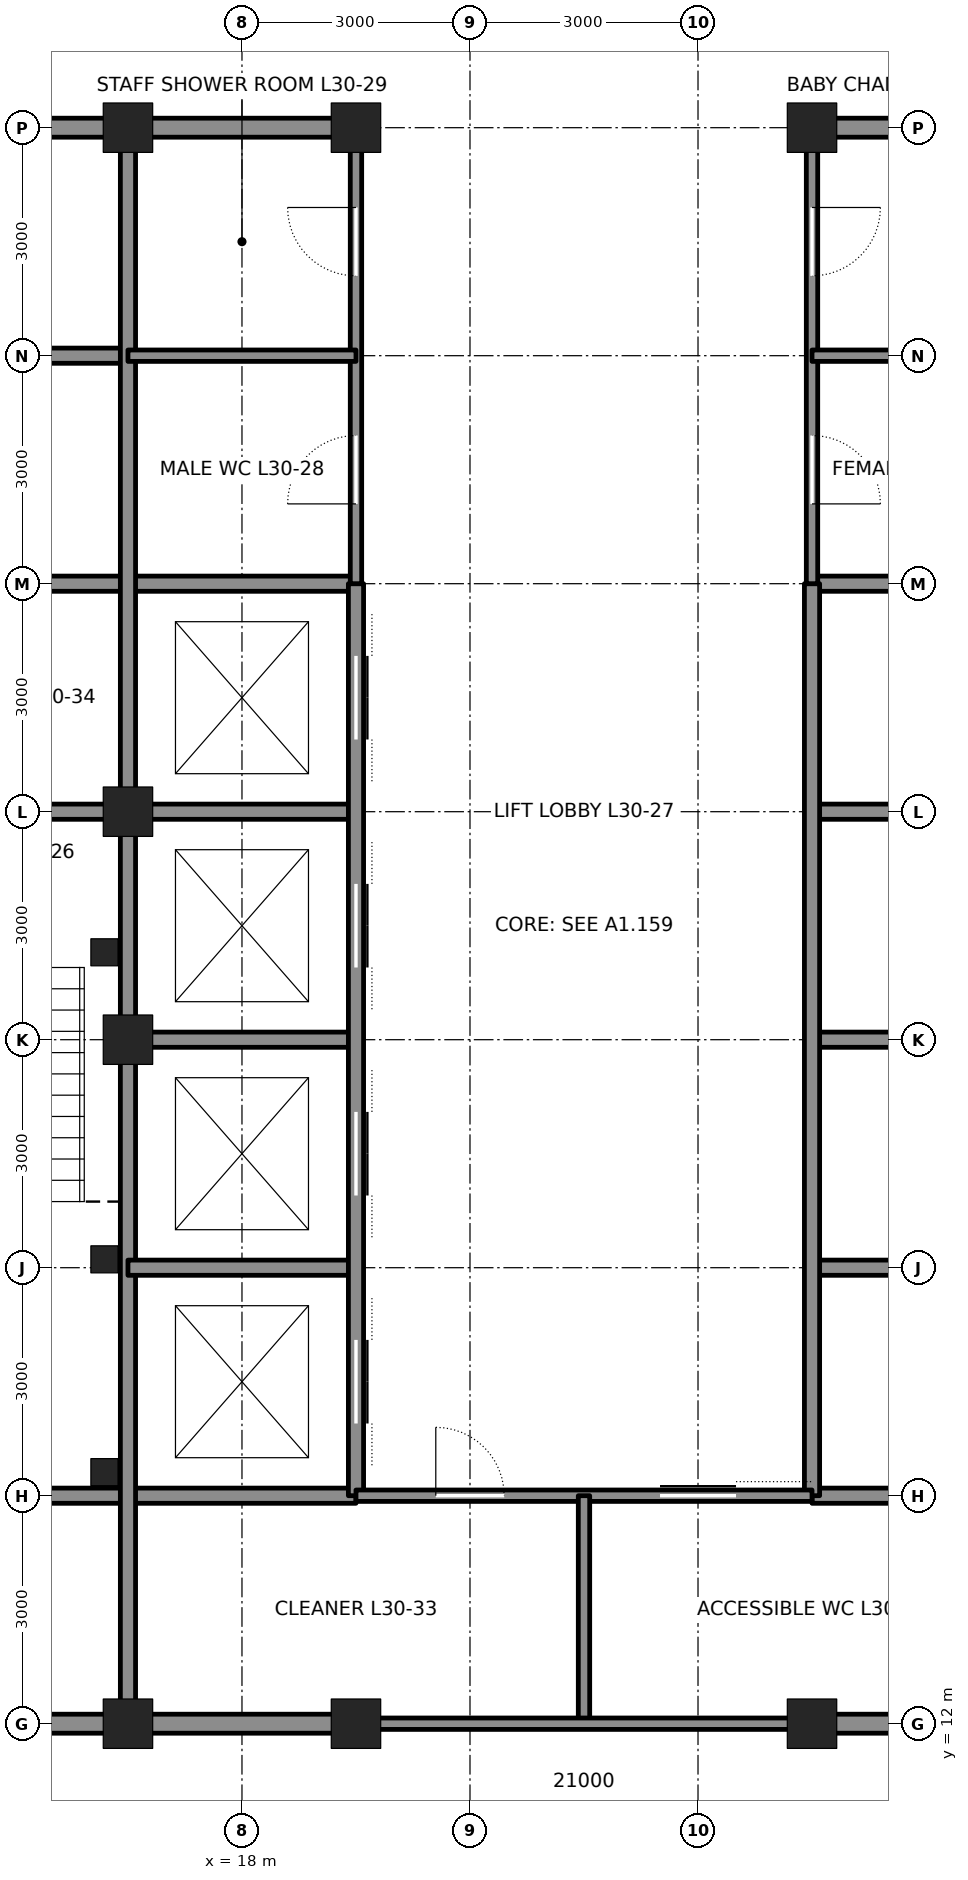
"""IFC4 building model, lengths in metres.
Left out: names, types, materials, properties, quantities, classifications, styles, units other than length and angle.
Written with IfcOpenShell. Run it as: python <this file> out.ifc"""

import sys

from ifc_helpers import new_model, si_unit, direction, frame, frame_2d, origin, origin_2d, place, context, subcontext, project, spatial, rectangle, hollow_rectangle, extrude, element, fill, save


model = new_model("IFC4")
c1 = context("Model", 3, precision=1e-05, world=origin(), true_north=direction((0.0, 1.0)))
c2 = subcontext(c1, "Body", "Model", "MODEL_VIEW")
j1 = project(units=[si_unit("LENGTHUNIT", "METRE"), si_unit("PLANEANGLEUNIT", "RADIAN")], contexts=[c1])
p1 = place(None, origin())
s1 = spatial("IfcSite", under=j1, at=p1, CompositionType="ELEMENT")
p2 = place(p1, origin())
s2 = spatial("IfcBuilding", under=s1, at=p2, CompositionType="ELEMENT")
p3 = place(p2, frame((0.0, 0.0, 140.4)))
s3 = spatial("IfcBuildingStorey", under=s2, at=p3, CompositionType="ELEMENT", Elevation=140.4)
for number, where, z_axis, x_axis in (
    (1, (16.5, 12.0, 0.0), (0.0, 0.0, 1.0), (1.0, 0.0, 0.0)),
    (2, (19.5, 12.0, 0.0), (0.0, 0.0, 1.0), (1.0, 0.0, 0.0)),
    (3, (25.5, 12.0, 0.0), (0.0, 0.0, 1.0), (1.0, 0.0, 0.0)),
    (4, (16.5, 33.0, 0.0), (0.0, 0.0, 1.0), (1.0, 0.0, 0.0)),
    (5, (19.5, 33.0, 0.0), (0.0, 0.0, 1.0), (1.0, 0.0, 0.0)),
    (6, (25.5, 33.0, 0.0), (0.0, 0.0, 1.0), (1.0, 0.0, 0.0)),
    (7, (16.5, 21.0, 0.0), (0.0, 0.0, 1.0), (1.0, 0.0, 0.0)),
    (8, (16.5, 24.0, 0.0), (0.0, 0.0, 1.0), (1.0, 0.0, 0.0)),
):
    element("IfcColumn", number, at=place(p3, frame(where, z_axis=z_axis, x_axis=x_axis)), inside=s3, PredefinedType="COLUMN", context=c2, shape_type="SweptSolid", body=[
        extrude(hollow_rectangle(XDim=0.65, YDim=0.65, WallThickness=0.065, at=origin_2d()), origin(), (0.0, 0.0, 1.0), 4.2),
    ])
p4 = place(p3, frame((12.25, 12.0, 0.0), z_axis=(0.0, 0.0, 1.0), x_axis=(1.0, 0.0, 0.0)))
e9 = element("IfcWall", 9, at=p4, inside=s3, PredefinedType="SOLIDWALL", context=c2, shape_type="SweptSolid", body=[
    extrude(rectangle(XDim=4.0, YDim=0.25, at=frame_2d((2.0, 0.0))), origin(), (0.0, 0.0, 1.0), 3.182),
])
for number, where, z_axis, x_axis in (
    (10, (16.75, 12.0, 0.0), (0.0, 0.0, 1.0), (1.0, 0.0, 0.0)),
    (11, (25.75, 12.0, 0.0), (0.0, 0.0, 1.0), (1.0, 0.0, 0.0)),
):
    element("IfcWall", number, at=place(p3, frame(where, z_axis=z_axis, x_axis=x_axis)), inside=s3, PredefinedType="SOLIDWALL", context=c2, shape_type="SweptSolid", body=[
        extrude(rectangle(XDim=2.5, YDim=0.25, at=frame_2d((1.25, 0.0))), origin(), (0.0, 0.0, 1.0), 3.182),
    ])
for number, where, z_axis, x_axis in (
    (12, (12.0, 15.0, 0.0), (0.0, 0.0, 1.0), (1.0, 0.0, 0.0)),
    (13, (25.5, 15.0, 0.0), (0.0, 0.0, 1.0), (1.0, 0.0, 0.0)),
):
    element("IfcWall", number, at=place(p3, frame(where, z_axis=z_axis, x_axis=x_axis)), inside=s3, PredefinedType="SOLIDWALL", context=c2, shape_type="SweptSolid", body=[
        extrude(rectangle(XDim=7.5, YDim=0.2, at=frame_2d((3.75, 0.0))), origin(), (0.0, 0.0, 1.0), 4.04),
    ])
p5 = place(p3, frame((12.25, 24.0, 0.0), z_axis=(0.0, 0.0, 1.0), x_axis=(1.0, 0.0, 0.0)))
e14 = element("IfcWall", 14, at=p5, inside=s3, PredefinedType="SOLIDWALL", context=c2, shape_type="SweptSolid", body=[
    extrude(rectangle(XDim=4.0, YDim=0.2, at=frame_2d((2.0, 0.0))), origin(), (0.0, 0.0, 1.0), 3.09),
])
p6 = place(p5, frame((1.4, 0.0, 0.0)))
e15 = element("IfcOpeningElement", 15, at=p6, cuts=e14, PredefinedType="OPENING", context=c2, shape_type="SweptSolid", body=[
    extrude(rectangle(XDim=1.2, YDim=2.1, at=frame_2d((0.6, 1.05))), frame((0.0, 0.11, 0.0), z_axis=(0.0, -1.0, 0.0), x_axis=(1.0, 0.0, 0.0)), (0.0, 0.0, 1.0), 0.22),
])
for number, where, z_axis, x_axis in (
    (16, (16.75, 24.0, 0.0), (0.0, 0.0, 1.0), (1.0, 0.0, 0.0)),
    (17, (25.5, 24.0, 0.0), (0.0, 0.0, 1.0), (1.0, 0.0, 0.0)),
):
    element("IfcWall", number, at=place(p3, frame(where, z_axis=z_axis, x_axis=x_axis)), inside=s3, PredefinedType="SOLIDWALL", context=c2, shape_type="SweptSolid", body=[
        extrude(rectangle(XDim=2.75, YDim=0.2, at=frame_2d((1.375, 0.0))), origin(), (0.0, 0.0, 1.0), 3.09),
    ])
p7 = place(p3, frame((12.0, 27.0, 0.0), z_axis=(0.0, 0.0, 1.0), x_axis=(1.0, 0.0, 0.0)))
e18 = element("IfcWall", 18, at=p7, inside=s3, PredefinedType="SOLIDWALL", context=c2, shape_type="SweptSolid", body=[
    extrude(rectangle(XDim=7.5, YDim=0.2, at=frame_2d((3.75, 0.0))), origin(), (0.0, 0.0, 1.0), 4.04),
])
p8 = place(p7, frame((1.65, 0.0, 0.0)))
e19 = element("IfcOpeningElement", 19, at=p8, cuts=e18, PredefinedType="OPENING", context=c2, shape_type="SweptSolid", body=[
    extrude(rectangle(XDim=1.2, YDim=2.1, at=frame_2d((0.6, 1.05))), frame((0.0, 0.11, 0.0), z_axis=(0.0, -1.0, 0.0), x_axis=(1.0, 0.0, 0.0)), (0.0, 0.0, 1.0), 0.22),
])
p9 = place(p3, frame((25.5, 27.0, 0.0), z_axis=(0.0, 0.0, 1.0), x_axis=(1.0, 0.0, 0.0)))
e20 = element("IfcWall", 20, at=p9, inside=s3, PredefinedType="SOLIDWALL", context=c2, shape_type="SweptSolid", body=[
    extrude(rectangle(XDim=3.0, YDim=0.2, at=frame_2d((1.5, 0.0))), origin(), (0.0, 0.0, 1.0), 4.04),
])
p10 = place(p3, frame((12.0, 30.0, 0.0), z_axis=(0.0, 0.0, 1.0), x_axis=(1.0, 0.0, 0.0)))
e21 = element("IfcWall", 21, at=p10, inside=s3, PredefinedType="SOLIDWALL", context=c2, shape_type="SweptSolid", body=[
    extrude(rectangle(XDim=4.5, YDim=0.2, at=frame_2d((2.25, 0.0))), origin(), (0.0, 0.0, 1.0), 4.04),
])
p11 = place(p3, frame((12.25, 33.0, 0.0), z_axis=(0.0, 0.0, 1.0), x_axis=(1.0, 0.0, 0.0)))
e22 = element("IfcWall", 22, at=p11, inside=s3, PredefinedType="SOLIDWALL", context=c2, shape_type="SweptSolid", body=[
    extrude(rectangle(XDim=4.0, YDim=0.25, at=frame_2d((2.0, 0.0))), origin(), (0.0, 0.0, 1.0), 3.182),
])
for number, where, z_axis, x_axis in (
    (23, (16.75, 33.0, 0.0), (0.0, 0.0, 1.0), (1.0, 0.0, 0.0)),
    (24, (25.75, 33.0, 0.0), (0.0, 0.0, 1.0), (1.0, 0.0, 0.0)),
):
    element("IfcWall", number, at=place(p3, frame(where, z_axis=z_axis, x_axis=x_axis)), inside=s3, PredefinedType="SOLIDWALL", context=c2, shape_type="SweptSolid", body=[
        extrude(rectangle(XDim=2.5, YDim=0.25, at=frame_2d((1.25, 0.0))), origin(), (0.0, 0.0, 1.0), 3.182),
    ])
p12 = place(p3, frame((16.5, 12.25, 0.0), z_axis=(0.0, 0.0, 1.0), x_axis=(0.0, 1.0, 0.0)))
e25 = element("IfcWall", 25, at=p12, inside=s3, PredefinedType="SOLIDWALL", context=c2, shape_type="SweptSolid", body=[
    extrude(rectangle(XDim=8.5, YDim=0.2, at=frame_2d((4.25, 0.0))), origin(), (0.0, 0.0, 1.0), 3.113),
])
p13 = place(p3, frame((16.5, 21.25, 0.0), z_axis=(0.0, 0.0, 1.0), x_axis=(0.0, 1.0, 0.0)))
e26 = element("IfcWall", 26, at=p13, inside=s3, PredefinedType="SOLIDWALL", context=c2, shape_type="SweptSolid", body=[
    extrude(rectangle(XDim=2.5, YDim=0.2, at=frame_2d((1.25, 0.0))), origin(), (0.0, 0.0, 1.0), 3.113),
])
p14 = place(p3, frame((16.5, 24.25, 0.0), z_axis=(0.0, 0.0, 1.0), x_axis=(0.0, 1.0, 0.0)))
e27 = element("IfcWall", 27, at=p14, inside=s3, PredefinedType="SOLIDWALL", context=c2, shape_type="SweptSolid", body=[
    extrude(rectangle(XDim=8.5, YDim=0.2, at=frame_2d((4.25, 0.0))), origin(), (0.0, 0.0, 1.0), 3.113),
])
p15 = place(p3, frame((16.5, 18.0, 0.0), z_axis=(0.0, 0.0, 1.0), x_axis=(1.0, 0.0, 0.0)))
e28 = element("IfcWall", 28, at=p15, inside=s3, PredefinedType="SOLIDWALL", context=c2, shape_type="SweptSolid", body=[
    extrude(rectangle(XDim=3.0, YDim=0.2, at=frame_2d((1.5, 0.0))), origin(), (0.0, 0.0, 1.0), 4.04),
])
p16 = place(p3, frame((25.5, 18.0, 0.0), z_axis=(0.0, 0.0, 1.0), x_axis=(1.0, 0.0, 0.0)))
e29 = element("IfcWall", 29, at=p16, inside=s3, PredefinedType="SOLIDWALL", context=c2, shape_type="SweptSolid", body=[
    extrude(rectangle(XDim=7.5, YDim=0.2, at=frame_2d((3.75, 0.0))), origin(), (0.0, 0.0, 1.0), 4.04),
])
p17 = place(p16, frame((4.65, 0.0, 0.0)))
e30 = element("IfcOpeningElement", 30, at=p17, cuts=e29, PredefinedType="OPENING", context=c2, shape_type="SweptSolid", body=[
    extrude(rectangle(XDim=1.2, YDim=2.1, at=frame_2d((0.6, 1.05))), frame((0.0, 0.11, 0.0), z_axis=(0.0, -1.0, 0.0), x_axis=(1.0, 0.0, 0.0)), (0.0, 0.0, 1.0), 0.22),
])
for number, where, z_axis, x_axis in (
    (31, (16.75, 21.0, 0.0), (0.0, 0.0, 1.0), (1.0, 0.0, 0.0)),
    (32, (25.5, 21.0, 0.0), (0.0, 0.0, 1.0), (1.0, 0.0, 0.0)),
):
    element("IfcWall", number, at=place(p3, frame(where, z_axis=z_axis, x_axis=x_axis)), inside=s3, PredefinedType="SOLIDWALL", context=c2, shape_type="SweptSolid", body=[
        extrude(rectangle(XDim=2.75, YDim=0.2, at=frame_2d((1.375, 0.0))), origin(), (0.0, 0.0, 1.0), 3.09),
    ])
p18 = place(p3, frame((19.5, 15.0, 0.0), z_axis=(0.0, 0.0, 1.0), x_axis=(0.0, 1.0, 0.0)))
e33 = element("IfcWall", 33, at=p18, inside=s3, PredefinedType="SOLIDWALL", context=c2, shape_type="SweptSolid", body=[
    extrude(rectangle(XDim=12.0, YDim=0.2, at=frame_2d((6.0, 0.0))), origin(), (0.0, 0.0, 1.0), 3.065),
])
p19 = place(p18, frame((0.95, 0.0, 0.0)))
e34 = element("IfcOpeningElement", 34, at=p19, cuts=e33, PredefinedType="OPENING", context=c2, shape_type="SweptSolid", body=[
    extrude(rectangle(XDim=1.1, YDim=2.1, at=frame_2d((0.55, 1.05))), frame((0.0, 0.11, 0.0), z_axis=(0.0, -1.0, 0.0), x_axis=(1.0, 0.0, 0.0)), (0.0, 0.0, 1.0), 0.22),
])
p20 = place(p18, frame((3.95, 0.0, 0.0)))
e35 = element("IfcOpeningElement", 35, at=p20, cuts=e33, PredefinedType="OPENING", context=c2, shape_type="SweptSolid", body=[
    extrude(rectangle(XDim=1.1, YDim=2.1, at=frame_2d((0.55, 1.05))), frame((0.0, 0.11, 0.0), z_axis=(0.0, -1.0, 0.0), x_axis=(1.0, 0.0, 0.0)), (0.0, 0.0, 1.0), 0.22),
])
p21 = place(p18, frame((6.95, 0.0, 0.0)))
e36 = element("IfcOpeningElement", 36, at=p21, cuts=e33, PredefinedType="OPENING", context=c2, shape_type="SweptSolid", body=[
    extrude(rectangle(XDim=1.1, YDim=2.1, at=frame_2d((0.55, 1.05))), frame((0.0, 0.11, 0.0), z_axis=(0.0, -1.0, 0.0), x_axis=(1.0, 0.0, 0.0)), (0.0, 0.0, 1.0), 0.22),
])
p22 = place(p18, frame((9.95, 0.0, 0.0)))
e37 = element("IfcOpeningElement", 37, at=p22, cuts=e33, PredefinedType="OPENING", context=c2, shape_type="SweptSolid", body=[
    extrude(rectangle(XDim=1.1, YDim=2.1, at=frame_2d((0.55, 1.05))), frame((0.0, 0.11, 0.0), z_axis=(0.0, -1.0, 0.0), x_axis=(1.0, 0.0, 0.0)), (0.0, 0.0, 1.0), 0.22),
])
p23 = place(p3, frame((19.5, 27.0, 0.0), z_axis=(0.0, 0.0, 1.0), x_axis=(0.0, 1.0, 0.0)))
e38 = element("IfcWall", 38, at=p23, inside=s3, PredefinedType="PARTITIONING", context=c2, shape_type="SweptSolid", body=[
    extrude(rectangle(XDim=5.75, YDim=0.15, at=frame_2d((2.875, 0.0))), origin(), (0.0, 0.0, 1.0), 3.065),
])
p24 = place(p23, frame((1.05, 0.0, 0.0)))
e39 = element("IfcOpeningElement", 39, at=p24, cuts=e38, PredefinedType="OPENING", context=c2, shape_type="SweptSolid", body=[
    extrude(rectangle(XDim=0.9, YDim=2.1, at=frame_2d((0.45, 1.05))), frame((0.0, 0.085, 0.0), z_axis=(0.0, -1.0, 0.0), x_axis=(1.0, 0.0, 0.0)), (0.0, 0.0, 1.0), 0.17),
])
p25 = place(p23, frame((4.05, 0.0, 0.0)))
e40 = element("IfcOpeningElement", 40, at=p25, cuts=e38, PredefinedType="OPENING", context=c2, shape_type="SweptSolid", body=[
    extrude(rectangle(XDim=0.9, YDim=2.1, at=frame_2d((0.45, 1.05))), frame((0.0, 0.085, 0.0), z_axis=(0.0, -1.0, 0.0), x_axis=(1.0, 0.0, 0.0)), (0.0, 0.0, 1.0), 0.17),
])
p26 = place(p3, frame((25.5, 15.0, 0.0), z_axis=(0.0, 0.0, 1.0), x_axis=(0.0, 1.0, 0.0)))
e41 = element("IfcWall", 41, at=p26, inside=s3, PredefinedType="SOLIDWALL", context=c2, shape_type="SweptSolid", body=[
    extrude(rectangle(XDim=12.0, YDim=0.2, at=frame_2d((6.0, 0.0))), origin(), (0.0, 0.0, 1.0), 3.065),
])
p27 = place(p3, frame((25.5, 27.0, 0.0), z_axis=(0.0, 0.0, 1.0), x_axis=(0.0, 1.0, 0.0)))
e42 = element("IfcWall", 42, at=p27, inside=s3, PredefinedType="PARTITIONING", context=c2, shape_type="SweptSolid", body=[
    extrude(rectangle(XDim=5.75, YDim=0.15, at=frame_2d((2.875, 0.0))), origin(), (0.0, 0.0, 1.0), 3.065),
])
p28 = place(p27, frame((1.05, 0.0, 0.0)))
e43 = element("IfcOpeningElement", 43, at=p28, cuts=e42, PredefinedType="OPENING", context=c2, shape_type="SweptSolid", body=[
    extrude(rectangle(XDim=0.9, YDim=2.1, at=frame_2d((0.45, 1.05))), frame((0.0, 0.085, 0.0), z_axis=(0.0, -1.0, 0.0), x_axis=(1.0, 0.0, 0.0)), (0.0, 0.0, 1.0), 0.17),
])
p29 = place(p27, frame((4.05, 0.0, 0.0)))
e44 = element("IfcOpeningElement", 44, at=p29, cuts=e42, PredefinedType="OPENING", context=c2, shape_type="SweptSolid", body=[
    extrude(rectangle(XDim=0.9, YDim=2.1, at=frame_2d((0.45, 1.05))), frame((0.0, 0.085, 0.0), z_axis=(0.0, -1.0, 0.0), x_axis=(1.0, 0.0, 0.0)), (0.0, 0.0, 1.0), 0.17),
])
p30 = place(p3, frame((19.5, 15.0, 0.0), z_axis=(0.0, 0.0, 1.0), x_axis=(1.0, 0.0, 0.0)))
e45 = element("IfcWall", 45, at=p30, inside=s3, PredefinedType="PARTITIONING", context=c2, shape_type="SweptSolid", body=[
    extrude(rectangle(XDim=6.0, YDim=0.15, at=frame_2d((3.0, 0.0))), origin(), (0.0, 0.0, 1.0), 4.04),
])
p31 = place(p30, frame((4.0, 0.0, 0.0)))
e46 = element("IfcOpeningElement", 46, at=p31, cuts=e45, PredefinedType="OPENING", context=c2, shape_type="SweptSolid", body=[
    extrude(rectangle(XDim=1.0, YDim=2.1, at=frame_2d((0.5, 1.05))), frame((0.0, 0.085, 0.0), z_axis=(0.0, -1.0, 0.0), x_axis=(1.0, 0.0, 0.0)), (0.0, 0.0, 1.0), 0.17),
])
p32 = place(p30, frame((1.05, 0.0, 0.0)))
e47 = element("IfcOpeningElement", 47, at=p32, cuts=e45, PredefinedType="OPENING", context=c2, shape_type="SweptSolid", body=[
    extrude(rectangle(XDim=0.9, YDim=2.1, at=frame_2d((0.45, 1.05))), frame((0.0, 0.085, 0.0), z_axis=(0.0, -1.0, 0.0), x_axis=(1.0, 0.0, 0.0)), (0.0, 0.0, 1.0), 0.17),
])
p33 = place(p3, frame((22.5, 15.0, 0.0), z_axis=(0.0, 0.0, 1.0), x_axis=(0.0, -1.0, 0.0)))
e48 = element("IfcWall", 48, at=p33, inside=s3, PredefinedType="PARTITIONING", context=c2, shape_type="SweptSolid", body=[
    extrude(rectangle(XDim=3.0, YDim=0.15, at=frame_2d((1.5, 0.0))), origin(), (0.0, 0.0, 1.0), 4.04),
])
p34 = place(p3, frame((19.5, 12.0, 0.0), z_axis=(0.0, 0.0, 1.0), x_axis=(1.0, 0.0, 0.0)))
e49 = element("IfcWall", 49, at=p34, inside=s3, PredefinedType="PARTITIONING", context=c2, shape_type="SweptSolid", body=[
    extrude(rectangle(XDim=6.0, YDim=0.15, at=frame_2d((3.0, 0.0))), origin(), (0.0, 0.0, 1.0), 3.182),
])
for number, where, z_axis, x_axis in (
    (50, (16.5, 30.0, 0.0), (0.0, 0.0, 1.0), (1.0, 0.0, 0.0)),
    (51, (25.5, 30.0, 0.0), (0.0, 0.0, 1.0), (1.0, 0.0, 0.0)),
):
    element("IfcWall", number, at=place(p3, frame(where, z_axis=z_axis, x_axis=x_axis)), inside=s3, PredefinedType="PARTITIONING", context=c2, shape_type="SweptSolid", body=[
        extrude(rectangle(XDim=3.0, YDim=0.15, at=frame_2d((1.5, 0.0))), origin(), (0.0, 0.0, 1.0), 4.04),
    ])
for number, where, z_axis, x_axis in (
    (52, (16.19, 15.31, 0.0), (0.0, 0.0, 1.0), (1.0, 0.0, 0.0)),
    (53, (16.19, 18.11, 0.0), (0.0, 0.0, 1.0), (1.0, 0.0, 0.0)),
    (54, (16.19, 22.15, 0.0), (0.0, 0.0, 1.0), (1.0, 0.0, 0.0)),
):
    element("IfcColumn", number, at=place(p3, frame(where, z_axis=z_axis, x_axis=x_axis)), inside=s3, PredefinedType="COLUMN", context=c2, shape_type="SweptSolid", body=[
        extrude(hollow_rectangle(XDim=0.356, YDim=0.356, WallThickness=0.015, at=origin_2d()), origin(), (0.0, 0.0, 1.0), 4.2),
    ])
p35 = place(p24, origin())
e55 = element("IfcDoor", 55, at=p35, inside=s3, OperationType="SINGLE_SWING_LEFT", PredefinedType="DOOR", context=c2, shape_type="SweptSolid", body=[
    extrude(rectangle(XDim=0.9, YDim=2.1, at=frame_2d((0.45, 1.05))), frame((0.0, 0.025, 0.0), z_axis=(0.0, -1.0, 0.0), x_axis=(1.0, 0.0, 0.0)), (0.0, 0.0, 1.0), 0.05),
])
fill(e39, e55)
p36 = place(p25, origin())
e56 = element("IfcDoor", 56, at=p36, inside=s3, OperationType="SINGLE_SWING_RIGHT", PredefinedType="DOOR", context=c2, shape_type="SweptSolid", body=[
    extrude(rectangle(XDim=0.9, YDim=2.1, at=frame_2d((0.45, 1.05))), frame((0.0, 0.025, 0.0), z_axis=(0.0, -1.0, 0.0), x_axis=(1.0, 0.0, 0.0)), (0.0, 0.0, 1.0), 0.05),
])
fill(e40, e56)
p37 = place(p28, frame((0.9, 0.0, 0.0), z_axis=(0.0, 0.0, 1.0), x_axis=(-1.0, 0.0, 0.0)))
e57 = element("IfcDoor", 57, at=p37, inside=s3, OperationType="SINGLE_SWING_RIGHT", PredefinedType="DOOR", context=c2, shape_type="SweptSolid", body=[
    extrude(rectangle(XDim=0.9, YDim=2.1, at=frame_2d((0.45, 1.05))), frame((0.0, 0.025, 0.0), z_axis=(0.0, -1.0, 0.0), x_axis=(1.0, 0.0, 0.0)), (0.0, 0.0, 1.0), 0.05),
])
fill(e43, e57)
p38 = place(p29, frame((0.9, 0.0, 0.0), z_axis=(0.0, 0.0, 1.0), x_axis=(-1.0, 0.0, 0.0)))
e58 = element("IfcDoor", 58, at=p38, inside=s3, OperationType="SINGLE_SWING_LEFT", PredefinedType="DOOR", context=c2, shape_type="SweptSolid", body=[
    extrude(rectangle(XDim=0.9, YDim=2.1, at=frame_2d((0.45, 1.05))), frame((0.0, 0.025, 0.0), z_axis=(0.0, -1.0, 0.0), x_axis=(1.0, 0.0, 0.0)), (0.0, 0.0, 1.0), 0.05),
])
fill(e44, e58)
p39 = place(p31, origin())
e59 = element("IfcDoor", 59, at=p39, inside=s3, OperationType="SLIDING_TO_LEFT", PredefinedType="DOOR", context=c2, shape_type="SweptSolid", body=[
    extrude(rectangle(XDim=1.0, YDim=2.1, at=frame_2d((0.5, 1.05))), frame((0.0, 0.025, 0.0), z_axis=(0.0, -1.0, 0.0), x_axis=(1.0, 0.0, 0.0)), (0.0, 0.0, 1.0), 0.05),
])
fill(e46, e59)
p40 = place(p32, origin())
e60 = element("IfcDoor", 60, at=p40, inside=s3, OperationType="SINGLE_SWING_LEFT", PredefinedType="DOOR", context=c2, shape_type="SweptSolid", body=[
    extrude(rectangle(XDim=0.9, YDim=2.1, at=frame_2d((0.45, 1.05))), frame((0.0, 0.025, 0.0), z_axis=(0.0, -1.0, 0.0), x_axis=(1.0, 0.0, 0.0)), (0.0, 0.0, 1.0), 0.05),
])
fill(e47, e60)
p41 = place(p19, origin())
e61 = element("IfcDoor", 61, at=p41, inside=s3, OperationType="DOUBLE_DOOR_SLIDING", PredefinedType="DOOR", context=c2, shape_type="SweptSolid", body=[
    extrude(rectangle(XDim=1.1, YDim=2.1, at=frame_2d((0.55, 1.05))), frame((0.0, 0.025, 0.0), z_axis=(0.0, -1.0, 0.0), x_axis=(1.0, 0.0, 0.0)), (0.0, 0.0, 1.0), 0.05),
])
fill(e34, e61)
p42 = place(p20, origin())
e62 = element("IfcDoor", 62, at=p42, inside=s3, OperationType="DOUBLE_DOOR_SLIDING", PredefinedType="DOOR", context=c2, shape_type="SweptSolid", body=[
    extrude(rectangle(XDim=1.1, YDim=2.1, at=frame_2d((0.55, 1.05))), frame((0.0, 0.025, 0.0), z_axis=(0.0, -1.0, 0.0), x_axis=(1.0, 0.0, 0.0)), (0.0, 0.0, 1.0), 0.05),
])
fill(e35, e62)
p43 = place(p21, origin())
e63 = element("IfcDoor", 63, at=p43, inside=s3, OperationType="DOUBLE_DOOR_SLIDING", PredefinedType="DOOR", context=c2, shape_type="SweptSolid", body=[
    extrude(rectangle(XDim=1.1, YDim=2.1, at=frame_2d((0.55, 1.05))), frame((0.0, 0.025, 0.0), z_axis=(0.0, -1.0, 0.0), x_axis=(1.0, 0.0, 0.0)), (0.0, 0.0, 1.0), 0.05),
])
fill(e36, e63)
p44 = place(p22, origin())
e64 = element("IfcDoor", 64, at=p44, inside=s3, OperationType="DOUBLE_DOOR_SLIDING", PredefinedType="DOOR", context=c2, shape_type="SweptSolid", body=[
    extrude(rectangle(XDim=1.1, YDim=2.1, at=frame_2d((0.55, 1.05))), frame((0.0, 0.025, 0.0), z_axis=(0.0, -1.0, 0.0), x_axis=(1.0, 0.0, 0.0)), (0.0, 0.0, 1.0), 0.05),
])
fill(e37, e64)
save(model, sys.argv[1])
